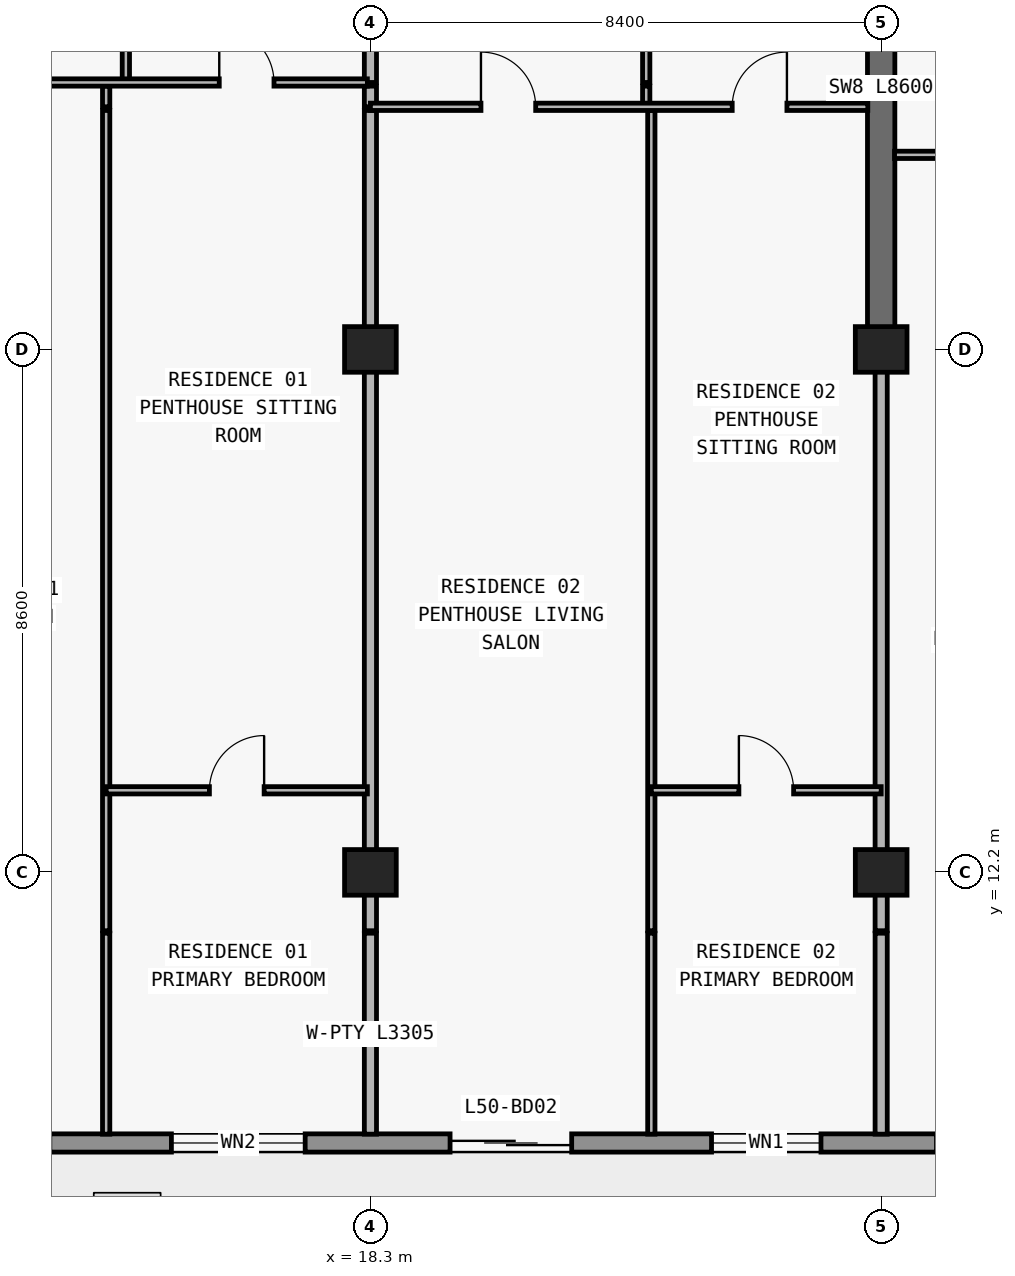
"""IFC4 building model, lengths in metres.
Left out: names, types, materials, properties, quantities, classifications, styles, units other than length and angle.
Written with IfcOpenShell. Run it as: python <this file> out.ifc"""

import sys

from ifc_helpers import new_model, si_unit, direction, frame, frame_2d, origin, origin_2d, place, context, subcontext, project, spatial, rectangle, extrude, element, fill, save


model = new_model("IFC4")
c1 = context("Model", 3, precision=1e-05, world=origin(), true_north=direction((0.0, 1.0)))
c2 = subcontext(c1, "Body", "Model", "MODEL_VIEW")
j1 = project(units=[si_unit("LENGTHUNIT", "METRE"), si_unit("PLANEANGLEUNIT", "RADIAN")], contexts=[c1])
p1 = place(None, origin())
s1 = spatial("IfcSite", under=j1, at=p1, CompositionType="ELEMENT")
p2 = place(p1, origin())
s2 = spatial("IfcBuilding", under=s1, at=p2, CompositionType="ELEMENT")
p3 = place(p2, frame((0.0, 0.0, 180.3)))
s3 = spatial("IfcBuildingStorey", under=s2, at=p3, CompositionType="ELEMENT", Elevation=180.3)
for number, where, z_axis, x_axis in (
    (1, (18.3, 12.2, 0.0), (0.0, 0.0, 1.0), (1.0, 0.0, 0.0)),
    (2, (26.7, 12.2, 0.0), (0.0, 0.0, 1.0), (1.0, 0.0, 0.0)),
    (3, (18.3, 20.8, 0.0), (0.0, 0.0, 1.0), (1.0, 0.0, 0.0)),
    (4, (26.7, 20.8, 0.0), (0.0, 0.0, 1.0), (1.0, 0.0, 0.0)),
):
    element("IfcColumn", number, at=place(p3, frame(where, z_axis=z_axis, x_axis=x_axis)), inside=s3, PredefinedType="COLUMN", context=c2, shape_type="SweptSolid", body=[
        extrude(rectangle(XDim=0.85, YDim=0.75, at=origin_2d()), origin(), (0.0, 0.0, 1.0), 3.0),
    ])
p4 = place(p3, frame((26.7, 20.8, 0.0), z_axis=(0.0, 0.0, 1.0), x_axis=(0.0, 1.0, 0.0)))
e5 = element("IfcWall", 5, at=p4, inside=s3, PredefinedType="SHEAR", context=c2, shape_type="SweptSolid", body=[
    extrude(rectangle(XDim=8.6, YDim=0.45, at=frame_2d((4.3, 0.0))), origin(), (0.0, 0.0, 1.0), 3.0),
])
p5 = place(p3, frame((67.7, 7.75, 0.0), z_axis=(0.0, 0.0, 1.0), x_axis=(-1.0, 0.0, 0.0)))
e6 = element("IfcWall", 6, at=p5, inside=s3, PredefinedType="STANDARD", context=c2, shape_type="SweptSolid", body=[
    extrude(rectangle(XDim=57.6, YDim=0.3, at=frame_2d((28.8, 0.0))), origin(), (0.0, 0.0, 1.0), 3.0),
])
p6 = place(p5, frame((54.673, 0.0, 0.0)))
e7 = element("IfcOpeningElement", 7, at=p6, cuts=e6, PredefinedType="OPENING", context=c2, shape_type="SweptSolid", body=[
    extrude(rectangle(XDim=2.0, YDim=2.3, at=frame_2d((1.0, 1.15))), frame((0.0, 0.16, 0.0), z_axis=(0.0, -1.0, 0.0), x_axis=(1.0, 0.0, 0.0)), (0.0, 0.0, 1.0), 0.32),
])
p7 = place(p5, frame((50.473, 0.0, 0.85)))
e8 = element("IfcOpeningElement", 8, at=p7, cuts=e6, PredefinedType="OPENING", context=c2, shape_type="SweptSolid", body=[
    extrude(rectangle(XDim=2.2, YDim=1.55, at=frame_2d((1.1, 0.775))), frame((0.0, 0.16, 0.0), z_axis=(0.0, -1.0, 0.0), x_axis=(1.0, 0.0, 0.0)), (0.0, 0.0, 1.0), 0.32),
])
p8 = place(p5, frame((46.09, 0.0, 0.0)))
e9 = element("IfcOpeningElement", 9, at=p8, cuts=e6, PredefinedType="OPENING", context=c2, shape_type="SweptSolid", body=[
    extrude(rectangle(XDim=2.0, YDim=2.3, at=frame_2d((1.0, 1.15))), frame((0.0, 0.16, 0.0), z_axis=(0.0, -1.0, 0.0), x_axis=(1.0, 0.0, 0.0)), (0.0, 0.0, 1.0), 0.32),
])
p9 = place(p5, frame((41.99, 0.0, 0.85)))
e10 = element("IfcOpeningElement", 10, at=p9, cuts=e6, PredefinedType="OPENING", context=c2, shape_type="SweptSolid", body=[
    extrude(rectangle(XDim=1.8, YDim=1.55, at=frame_2d((0.9, 0.775))), frame((0.0, 0.16, 0.0), z_axis=(0.0, -1.0, 0.0), x_axis=(1.0, 0.0, 0.0)), (0.0, 0.0, 1.0), 0.32),
])
p10 = place(p5, frame((38.09, 0.0, 0.0)))
e11 = element("IfcOpeningElement", 11, at=p10, cuts=e6, PredefinedType="OPENING", context=c2, shape_type="SweptSolid", body=[
    extrude(rectangle(XDim=2.0, YDim=2.3, at=frame_2d((1.0, 1.15))), frame((0.0, 0.16, 0.0), z_axis=(0.0, -1.0, 0.0), x_axis=(1.0, 0.0, 0.0)), (0.0, 0.0, 1.0), 0.32),
])
p11 = place(p5, frame((33.41, 0.0, 0.65)))
e12 = element("IfcOpeningElement", 12, at=p11, cuts=e6, PredefinedType="OPENING", context=c2, shape_type="SweptSolid", body=[
    extrude(rectangle(XDim=2.6, YDim=1.85, at=frame_2d((1.3, 0.925))), frame((0.0, 0.16, 0.0), z_axis=(0.0, -1.0, 0.0), x_axis=(1.0, 0.0, 0.0)), (0.0, 0.0, 1.0), 0.32),
])
p12 = place(p5, frame((27.7, 0.0, 0.85)))
e13 = element("IfcOpeningElement", 13, at=p12, cuts=e6, PredefinedType="OPENING", context=c2, shape_type="SweptSolid", body=[
    extrude(rectangle(XDim=2.2, YDim=1.55, at=frame_2d((1.1, 0.775))), frame((0.0, 0.16, 0.0), z_axis=(0.0, -1.0, 0.0), x_axis=(1.0, 0.0, 0.0)), (0.0, 0.0, 1.0), 0.32),
])
p13 = place(p5, frame((19.7, 0.0, 0.85)))
e14 = element("IfcOpeningElement", 14, at=p13, cuts=e6, PredefinedType="OPENING", context=c2, shape_type="SweptSolid", body=[
    extrude(rectangle(XDim=2.2, YDim=1.55, at=frame_2d((1.1, 0.775))), frame((0.0, 0.16, 0.0), z_axis=(0.0, -1.0, 0.0), x_axis=(1.0, 0.0, 0.0)), (0.0, 0.0, 1.0), 0.32),
])
p14 = place(p5, frame((13.29, 0.0, 0.0)))
e15 = element("IfcOpeningElement", 15, at=p14, cuts=e6, PredefinedType="OPENING", context=c2, shape_type="SweptSolid", body=[
    extrude(rectangle(XDim=2.0, YDim=2.3, at=frame_2d((1.0, 1.15))), frame((0.0, 0.16, 0.0), z_axis=(0.0, -1.0, 0.0), x_axis=(1.0, 0.0, 0.0)), (0.0, 0.0, 1.0), 0.32),
])
p15 = place(p5, frame((9.19, 0.0, 0.85)))
e16 = element("IfcOpeningElement", 16, at=p15, cuts=e6, PredefinedType="OPENING", context=c2, shape_type="SweptSolid", body=[
    extrude(rectangle(XDim=1.8, YDim=1.55, at=frame_2d((0.9, 0.775))), frame((0.0, 0.16, 0.0), z_axis=(0.0, -1.0, 0.0), x_axis=(1.0, 0.0, 0.0)), (0.0, 0.0, 1.0), 0.32),
])
p16 = place(p5, frame((5.273, 0.0, 0.0)))
e17 = element("IfcOpeningElement", 17, at=p16, cuts=e6, PredefinedType="OPENING", context=c2, shape_type="SweptSolid", body=[
    extrude(rectangle(XDim=2.0, YDim=2.3, at=frame_2d((1.0, 1.15))), frame((0.0, 0.16, 0.0), z_axis=(0.0, -1.0, 0.0), x_axis=(1.0, 0.0, 0.0)), (0.0, 0.0, 1.0), 0.32),
])
p17 = place(p5, frame((1.073, 0.0, 0.85)))
e18 = element("IfcOpeningElement", 18, at=p17, cuts=e6, PredefinedType="OPENING", context=c2, shape_type="SweptSolid", body=[
    extrude(rectangle(XDim=2.2, YDim=1.55, at=frame_2d((1.1, 0.775))), frame((0.0, 0.16, 0.0), z_axis=(0.0, -1.0, 0.0), x_axis=(1.0, 0.0, 0.0)), (0.0, 0.0, 1.0), 0.32),
])
p18 = place(p3, frame((13.954, 7.895, 0.0), z_axis=(0.0, 0.0, 1.0), x_axis=(0.0, 1.0, 0.0)))
e19 = element("IfcWall", 19, at=p18, inside=s3, PredefinedType="PARTITIONING", context=c2, shape_type="SweptSolid", body=[
    extrude(rectangle(XDim=3.305, YDim=0.12, at=frame_2d((1.652, 0.0))), origin(), (0.0, 0.0, 1.0), 3.0),
])
p19 = place(p3, frame((13.954, 11.24, 0.0), z_axis=(0.0, 0.0, 1.0), x_axis=(0.0, 1.0, 0.0)))
e20 = element("IfcWall", 20, at=p19, inside=s3, PredefinedType="PARTITIONING", context=c2, shape_type="SweptSolid", body=[
    extrude(rectangle(XDim=13.49, YDim=0.12, at=frame_2d((6.745, 0.0))), origin(), (0.0, 0.0, 1.0), 3.0),
])
p20 = place(p3, frame((13.954, 24.79, 0.0), z_axis=(0.0, 0.0, 1.0), x_axis=(0.0, 1.0, 0.0)))
e21 = element("IfcWall", 21, at=p20, inside=s3, PredefinedType="PARTITIONING", context=c2, shape_type="SweptSolid", body=[
    extrude(rectangle(XDim=0.34, YDim=0.12, at=frame_2d((0.17, 0.0))), origin(), (0.0, 0.0, 1.0), 3.0),
])
p21 = place(p3, frame((14.278, 25.19, 0.0), z_axis=(0.0, 0.0, 1.0), x_axis=(0.0, 1.0, 0.0)))
e22 = element("IfcWall", 22, at=p21, inside=s3, PredefinedType="PARTITIONING", context=c2, shape_type="SweptSolid", body=[
    extrude(rectangle(XDim=4.69, YDim=0.12, at=frame_2d((2.345, 0.0))), origin(), (0.0, 0.0, 1.0), 3.0),
])
p22 = place(p21, frame((1.895, 0.0, 0.0)))
e23 = element("IfcOpeningElement", 23, at=p22, cuts=e22, PredefinedType="OPENING", context=c2, shape_type="SweptSolid", body=[
    extrude(rectangle(XDim=0.9, YDim=2.15, at=frame_2d((0.45, 1.075))), frame((0.0, 0.07, 0.0), z_axis=(0.0, -1.0, 0.0), x_axis=(1.0, 0.0, 0.0)), (0.0, 0.0, 1.0), 0.14),
])
p23 = place(p3, frame((18.3, 7.895, 0.0), z_axis=(0.0, 0.0, 1.0), x_axis=(0.0, 1.0, 0.0)))
e24 = element("IfcWall", 24, at=p23, inside=s3, PredefinedType="PARTITIONING", context=c2, shape_type="SweptSolid", body=[
    extrude(rectangle(XDim=3.305, YDim=0.2, at=frame_2d((1.652, 0.0))), origin(), (0.0, 0.0, 1.0), 3.0),
])
p24 = place(p3, frame((18.3, 11.24, 0.0), z_axis=(0.0, 0.0, 1.0), x_axis=(0.0, 1.0, 0.0)))
e25 = element("IfcWall", 25, at=p24, inside=s3, PredefinedType="PARTITIONING", context=c2, shape_type="SweptSolid", body=[
    extrude(rectangle(XDim=13.49, YDim=0.2, at=frame_2d((6.745, 0.0))), origin(), (0.0, 0.0, 1.0), 2.213),
])
p25 = place(p3, frame((18.3, 24.79, 0.0), z_axis=(0.0, 0.0, 1.0), x_axis=(0.0, 1.0, 0.0)))
e26 = element("IfcWall", 26, at=p25, inside=s3, PredefinedType="PARTITIONING", context=c2, shape_type="SweptSolid", body=[
    extrude(rectangle(XDim=0.34, YDim=0.2, at=frame_2d((0.17, 0.0))), origin(), (0.0, 0.0, 1.0), 2.213),
])
p26 = place(p3, frame((18.3, 25.19, 0.0), z_axis=(0.0, 0.0, 1.0), x_axis=(0.0, 1.0, 0.0)))
e27 = element("IfcWall", 27, at=p26, inside=s3, PredefinedType="PARTITIONING", context=c2, shape_type="SweptSolid", body=[
    extrude(rectangle(XDim=4.69, YDim=0.2, at=frame_2d((2.345, 0.0))), origin(), (0.0, 0.0, 1.0), 2.213),
])
p27 = place(p3, frame((22.836, 24.79, 0.0), z_axis=(0.0, 0.0, 1.0), x_axis=(0.0, 1.0, 0.0)))
e28 = element("IfcWall", 28, at=p27, inside=s3, PredefinedType="PARTITIONING", context=c2, shape_type="SweptSolid", body=[
    extrude(rectangle(XDim=0.34, YDim=0.12, at=frame_2d((0.17, 0.0))), origin(), (0.0, 0.0, 1.0), 3.0),
])
p28 = place(p3, frame((22.836, 25.19, 0.0), z_axis=(0.0, 0.0, 1.0), x_axis=(0.0, 1.0, 0.0)))
e29 = element("IfcWall", 29, at=p28, inside=s3, PredefinedType="PARTITIONING", context=c2, shape_type="SweptSolid", body=[
    extrude(rectangle(XDim=4.69, YDim=0.12, at=frame_2d((2.345, 0.0))), origin(), (0.0, 0.0, 1.0), 3.0),
])
p29 = place(p28, frame((1.895, 0.0, 0.0)))
e30 = element("IfcOpeningElement", 30, at=p29, cuts=e29, PredefinedType="OPENING", context=c2, shape_type="SweptSolid", body=[
    extrude(rectangle(XDim=0.9, YDim=2.15, at=frame_2d((0.45, 1.075))), frame((0.0, 0.07, 0.0), z_axis=(0.0, -1.0, 0.0), x_axis=(1.0, 0.0, 0.0)), (0.0, 0.0, 1.0), 0.14),
])
p30 = place(p3, frame((22.92, 7.895, 0.0), z_axis=(0.0, 0.0, 1.0), x_axis=(0.0, 1.0, 0.0)))
e31 = element("IfcWall", 31, at=p30, inside=s3, PredefinedType="PARTITIONING", context=c2, shape_type="SweptSolid", body=[
    extrude(rectangle(XDim=3.305, YDim=0.12, at=frame_2d((1.652, 0.0))), origin(), (0.0, 0.0, 1.0), 3.0),
])
p31 = place(p3, frame((22.92, 11.24, 0.0), z_axis=(0.0, 0.0, 1.0), x_axis=(0.0, 1.0, 0.0)))
e32 = element("IfcWall", 32, at=p31, inside=s3, PredefinedType="PARTITIONING", context=c2, shape_type="SweptSolid", body=[
    extrude(rectangle(XDim=13.49, YDim=0.12, at=frame_2d((6.745, 0.0))), origin(), (0.0, 0.0, 1.0), 3.0),
])
p32 = place(p3, frame((26.7, 7.895, 0.0), z_axis=(0.0, 0.0, 1.0), x_axis=(0.0, 1.0, 0.0)))
e33 = element("IfcWall", 33, at=p32, inside=s3, PredefinedType="PARTITIONING", context=c2, shape_type="SweptSolid", body=[
    extrude(rectangle(XDim=3.305, YDim=0.2, at=frame_2d((1.652, 0.0))), origin(), (0.0, 0.0, 1.0), 3.0),
])
p33 = place(p3, frame((26.7, 11.24, 0.0), z_axis=(0.0, 0.0, 1.0), x_axis=(0.0, 1.0, 0.0)))
e34 = element("IfcWall", 34, at=p33, inside=s3, PredefinedType="PARTITIONING", context=c2, shape_type="SweptSolid", body=[
    extrude(rectangle(XDim=9.555, YDim=0.2, at=frame_2d((4.777, 0.0))), origin(), (0.0, 0.0, 1.0), 2.213),
])
p34 = place(p3, frame((13.954, 13.55, 0.0), z_axis=(0.0, 0.0, 1.0), x_axis=(1.0, 0.0, 0.0)))
e35 = element("IfcWall", 35, at=p34, inside=s3, PredefinedType="PARTITIONING", context=c2, shape_type="SweptSolid", body=[
    extrude(rectangle(XDim=4.296, YDim=0.12, at=frame_2d((2.148, 0.0))), origin(), (0.0, 0.0, 1.0), 3.0),
])
p35 = place(p34, frame((1.698, 0.0, 0.0)))
e36 = element("IfcOpeningElement", 36, at=p35, cuts=e35, PredefinedType="OPENING", context=c2, shape_type="SweptSolid", body=[
    extrude(rectangle(XDim=0.9, YDim=2.15, at=frame_2d((0.45, 1.075))), frame((0.0, 0.07, 0.0), z_axis=(0.0, -1.0, 0.0), x_axis=(1.0, 0.0, 0.0)), (0.0, 0.0, 1.0), 0.14),
])
p36 = place(p3, frame((22.92, 13.55, 0.0), z_axis=(0.0, 0.0, 1.0), x_axis=(1.0, 0.0, 0.0)))
e37 = element("IfcWall", 37, at=p36, inside=s3, PredefinedType="PARTITIONING", context=c2, shape_type="SweptSolid", body=[
    extrude(rectangle(XDim=3.78, YDim=0.12, at=frame_2d((1.89, 0.0))), origin(), (0.0, 0.0, 1.0), 3.0),
])
p37 = place(p36, frame((1.44, 0.0, 0.0)))
e38 = element("IfcOpeningElement", 38, at=p37, cuts=e37, PredefinedType="OPENING", context=c2, shape_type="SweptSolid", body=[
    extrude(rectangle(XDim=0.9, YDim=2.15, at=frame_2d((0.45, 1.075))), frame((0.0, 0.07, 0.0), z_axis=(0.0, -1.0, 0.0), x_axis=(1.0, 0.0, 0.0)), (0.0, 0.0, 1.0), 0.14),
])
p38 = place(p3, frame((26.92, 24.0, 0.0), z_axis=(0.0, 0.0, 1.0), x_axis=(1.0, 0.0, 0.0)))
e39 = element("IfcWall", 39, at=p38, inside=s3, PredefinedType="PARTITIONING", context=c2, shape_type="SweptSolid", body=[
    extrude(rectangle(XDim=8.18, YDim=0.12, at=frame_2d((4.09, 0.0))), origin(), (0.0, 0.0, 1.0), 3.0),
])
p39 = place(p38, frame((1.33, 0.0, 0.0)))
e40 = element("IfcOpeningElement", 40, at=p39, cuts=e39, PredefinedType="OPENING", context=c2, shape_type="SweptSolid", body=[
    extrude(rectangle(XDim=0.9, YDim=2.15, at=frame_2d((0.45, 1.075))), frame((0.0, 0.07, 0.0), z_axis=(0.0, -1.0, 0.0), x_axis=(1.0, 0.0, 0.0)), (0.0, 0.0, 1.0), 0.14),
])
p40 = place(p3, frame((18.3, 24.79, 0.0), z_axis=(0.0, 0.0, 1.0), x_axis=(1.0, 0.0, 0.0)))
e41 = element("IfcWall", 41, at=p40, inside=s3, PredefinedType="PARTITIONING", context=c2, shape_type="SweptSolid", body=[
    extrude(rectangle(XDim=8.18, YDim=0.12, at=frame_2d((4.09, 0.0))), origin(), (0.0, 0.0, 1.0), 3.0),
])
p41 = place(p40, frame((1.818, 0.0, 0.0)))
e42 = element("IfcOpeningElement", 42, at=p41, cuts=e41, PredefinedType="OPENING", context=c2, shape_type="SweptSolid", body=[
    extrude(rectangle(XDim=0.9, YDim=2.15, at=frame_2d((0.45, 1.075))), frame((0.0, 0.07, 0.0), z_axis=(0.0, -1.0, 0.0), x_axis=(1.0, 0.0, 0.0)), (0.0, 0.0, 1.0), 0.14),
])
p42 = place(p40, frame((5.95, 0.0, 0.0)))
e43 = element("IfcOpeningElement", 43, at=p42, cuts=e41, PredefinedType="OPENING", context=c2, shape_type="SweptSolid", body=[
    extrude(rectangle(XDim=0.9, YDim=2.15, at=frame_2d((0.45, 1.075))), frame((0.0, 0.07, 0.0), z_axis=(0.0, -1.0, 0.0), x_axis=(1.0, 0.0, 0.0)), (0.0, 0.0, 1.0), 0.14),
])
p43 = place(p3, frame((10.1, 25.19, 0.0), z_axis=(0.0, 0.0, 1.0), x_axis=(1.0, 0.0, 0.0)))
e44 = element("IfcWall", 44, at=p43, inside=s3, PredefinedType="PARTITIONING", context=c2, shape_type="SweptSolid", body=[
    extrude(rectangle(XDim=8.15, YDim=0.12, at=frame_2d((4.075, 0.0))), origin(), (0.0, 0.0, 1.0), 3.0),
])
p44 = place(p43, frame((1.477, 0.0, 0.0)))
e45 = element("IfcOpeningElement", 45, at=p44, cuts=e44, PredefinedType="OPENING", context=c2, shape_type="SweptSolid", body=[
    extrude(rectangle(XDim=0.9, YDim=2.15, at=frame_2d((0.45, 1.075))), frame((0.0, 0.07, 0.0), z_axis=(0.0, -1.0, 0.0), x_axis=(1.0, 0.0, 0.0)), (0.0, 0.0, 1.0), 0.14),
])
p45 = place(p43, frame((5.714, 0.0, 0.0)))
e46 = element("IfcOpeningElement", 46, at=p45, cuts=e44, PredefinedType="OPENING", context=c2, shape_type="SweptSolid", body=[
    extrude(rectangle(XDim=0.9, YDim=2.15, at=frame_2d((0.45, 1.075))), frame((0.0, 0.07, 0.0), z_axis=(0.0, -1.0, 0.0), x_axis=(1.0, 0.0, 0.0)), (0.0, 0.0, 1.0), 0.14),
])
p46 = place(p7, origin())
e47 = element("IfcWindow", 47, at=p46, inside=s3, PartitioningType="SINGLE_PANEL", PredefinedType="WINDOW", context=c2, shape_type="SweptSolid", body=[
    extrude(rectangle(XDim=2.2, YDim=1.55, at=frame_2d((1.1, 0.775))), frame((0.0, 0.03, 0.0), z_axis=(0.0, -1.0, 0.0), x_axis=(1.0, 0.0, 0.0)), (0.0, 0.0, 1.0), 0.06),
])
fill(e8, e47)
p47 = place(p8, origin())
e48 = element("IfcDoor", 48, at=p47, inside=s3, OperationType="DOUBLE_DOOR_SLIDING", PredefinedType="DOOR", context=c2, shape_type="SweptSolid", body=[
    extrude(rectangle(XDim=2.0, YDim=2.3, at=frame_2d((1.0, 1.15))), frame((0.0, 0.025, 0.0), z_axis=(0.0, -1.0, 0.0), x_axis=(1.0, 0.0, 0.0)), (0.0, 0.0, 1.0), 0.05),
])
fill(e9, e48)
p48 = place(p9, origin())
e49 = element("IfcWindow", 49, at=p48, inside=s3, PartitioningType="SINGLE_PANEL", PredefinedType="WINDOW", context=c2, shape_type="SweptSolid", body=[
    extrude(rectangle(XDim=1.8, YDim=1.55, at=frame_2d((0.9, 0.775))), frame((0.0, 0.03, 0.0), z_axis=(0.0, -1.0, 0.0), x_axis=(1.0, 0.0, 0.0)), (0.0, 0.0, 1.0), 0.06),
])
fill(e10, e49)
p49 = place(p45, origin())
e50 = element("IfcDoor", 50, at=p49, inside=s3, OperationType="SINGLE_SWING_LEFT", PredefinedType="DOOR", context=c2, shape_type="SweptSolid", body=[
    extrude(rectangle(XDim=0.9, YDim=2.15, at=frame_2d((0.45, 1.075))), frame((0.0, 0.025, 0.0), z_axis=(0.0, -1.0, 0.0), x_axis=(1.0, 0.0, 0.0)), (0.0, 0.0, 1.0), 0.05),
])
fill(e46, e50)
p50 = place(p35, origin())
e51 = element("IfcDoor", 51, at=p50, inside=s3, OperationType="SINGLE_SWING_RIGHT", PredefinedType="DOOR", context=c2, shape_type="SweptSolid", body=[
    extrude(rectangle(XDim=0.9, YDim=2.15, at=frame_2d((0.45, 1.075))), frame((0.0, 0.025, 0.0), z_axis=(0.0, -1.0, 0.0), x_axis=(1.0, 0.0, 0.0)), (0.0, 0.0, 1.0), 0.05),
])
fill(e36, e51)
p51 = place(p41, origin())
e52 = element("IfcDoor", 52, at=p51, inside=s3, OperationType="SINGLE_SWING_LEFT", PredefinedType="DOOR", context=c2, shape_type="SweptSolid", body=[
    extrude(rectangle(XDim=0.9, YDim=2.15, at=frame_2d((0.45, 1.075))), frame((0.0, 0.025, 0.0), z_axis=(0.0, -1.0, 0.0), x_axis=(1.0, 0.0, 0.0)), (0.0, 0.0, 1.0), 0.05),
])
fill(e42, e52)
p52 = place(p42, origin())
e53 = element("IfcDoor", 53, at=p52, inside=s3, OperationType="SINGLE_SWING_RIGHT", PredefinedType="DOOR", context=c2, shape_type="SweptSolid", body=[
    extrude(rectangle(XDim=0.9, YDim=2.15, at=frame_2d((0.45, 1.075))), frame((0.0, 0.025, 0.0), z_axis=(0.0, -1.0, 0.0), x_axis=(1.0, 0.0, 0.0)), (0.0, 0.0, 1.0), 0.05),
])
fill(e43, e53)
p53 = place(p37, origin())
e54 = element("IfcDoor", 54, at=p53, inside=s3, OperationType="SINGLE_SWING_LEFT", PredefinedType="DOOR", context=c2, shape_type="SweptSolid", body=[
    extrude(rectangle(XDim=0.9, YDim=2.15, at=frame_2d((0.45, 1.075))), frame((0.0, 0.025, 0.0), z_axis=(0.0, -1.0, 0.0), x_axis=(1.0, 0.0, 0.0)), (0.0, 0.0, 1.0), 0.05),
])
fill(e38, e54)
save(model, sys.argv[1])
